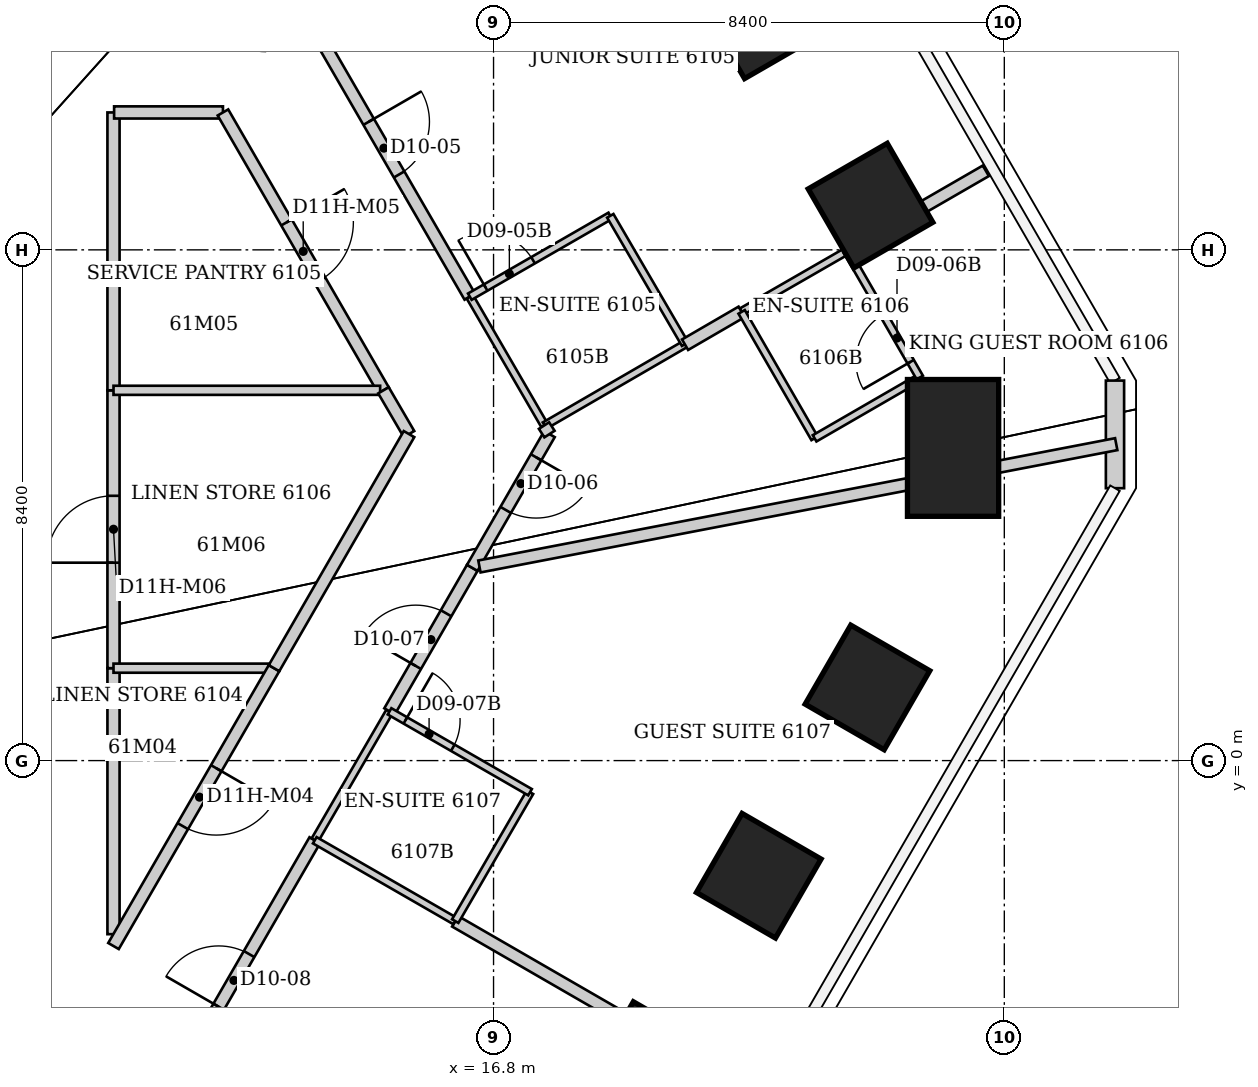
"""IFC4 building model, lengths in metres.
Left out: names, types, materials, properties, quantities, classifications, styles, units other than length and angle.
Written with IfcOpenShell. Run it as: python <this file> out.ifc"""

import sys

from ifc_helpers import new_model, si_unit, direction, frame, frame_2d, origin, origin_2d, place, context, subcontext, project, spatial, rectangle, extrude, element, fill, save


model = new_model("IFC4")
c1 = context("Model", 3, precision=1e-05, world=origin(), true_north=direction((0.0, 1.0)))
c2 = subcontext(c1, "Body", "Model", "MODEL_VIEW")
j1 = project(units=[si_unit("LENGTHUNIT", "METRE"), si_unit("PLANEANGLEUNIT", "RADIAN")], contexts=[c1])
p1 = place(None, origin())
s1 = spatial("IfcSite", under=j1, at=p1, CompositionType="ELEMENT")
p2 = place(p1, origin())
s2 = spatial("IfcBuilding", under=s1, at=p2, CompositionType="ELEMENT")
p3 = place(p2, frame((0.0, 0.0, 244.0)))
s3 = spatial("IfcBuildingStorey", under=s2, at=p3, CompositionType="ELEMENT", Elevation=244.0)
p4 = place(p3, frame((21.203, 12.241, 0.0), z_axis=(-0.05903355077, -0.034099727481, 0.997673417742), x_axis=(0.863904737752, 0.499019891948, 0.068174419916)))
e1 = element("IfcColumn", 1, at=p4, inside=s3, PredefinedType="COLUMN", context=c2, shape_type="SweptSolid", body=[
    extrude(rectangle(XDim=1.5, YDim=1.5, at=origin_2d()), origin(), (0.0, 0.0, 1.0), 3.809),
])
p5 = place(p3, frame((23.0, 9.127, 0.0), z_axis=(-0.064029932807, -0.025445328653, 0.997623527667), x_axis=(0.863429873399, 0.499842225125, 0.068166001086)))
e2 = element("IfcColumn", 2, at=p5, inside=s3, PredefinedType="COLUMN", context=c2, shape_type="SweptSolid", body=[
    extrude(rectangle(XDim=1.5, YDim=1.5, at=origin_2d()), origin(), (0.0, 0.0, 1.0), 3.809),
])
p6 = place(p3, frame((24.357, 5.143, 0.0), z_axis=(-0.069531443306, -0.014675300016, 0.997471811111), x_axis=(0.99757975799, -0.001092604117, 0.069522893098)))
e3 = element("IfcColumn", 3, at=p6, inside=s3, PredefinedType="COLUMN", context=c2, shape_type="SweptSolid", body=[
    extrude(rectangle(XDim=1.5, YDim=2.25, at=origin_2d()), origin(), (0.0, 0.0, 1.0), 3.81),
])
p7 = place(p3, frame((22.949, 1.203, 0.0), z_axis=(-0.064944143672, -0.003397867339, 0.997883115751), x_axis=(0.863717362202, -0.501020333053, 0.054506367508)))
e4 = element("IfcColumn", 4, at=p7, inside=s3, PredefinedType="COLUMN", context=c2, shape_type="SweptSolid", body=[
    extrude(rectangle(XDim=1.5, YDim=1.5, at=origin_2d()), origin(), (0.0, 0.0, 1.0), 3.808),
])
p8 = place(p3, frame((21.162, -1.894, 0.0), z_axis=(-0.059897811742, 0.005386955232, 0.998189978342), x_axis=(0.863828729651, -0.500824842558, 0.05453808675)))
e5 = element("IfcColumn", 5, at=p8, inside=s3, PredefinedType="COLUMN", context=c2, shape_type="SweptSolid", body=[
    extrude(rectangle(XDim=1.5, YDim=1.5, at=origin_2d()), origin(), (0.0, 0.0, 1.0), 3.807),
])
p9 = place(p3, frame((19.374, -4.991, 0.0), z_axis=(-0.054906736272, 0.014111544369, 0.998391764102), x_axis=(0.864606052926, -0.499473967902, 0.054608869531)))
e6 = element("IfcColumn", 6, at=p9, inside=s3, PredefinedType="COLUMN", context=c2, shape_type="SweptSolid", body=[
    extrude(rectangle(XDim=1.5, YDim=1.5, at=origin_2d()), origin(), (0.0, 0.0, 1.0), 3.806),
])
p10 = place(p3, frame((27.02, 6.25, 0.0), z_axis=(0.0, 0.0, 1.0), x_axis=(0.0, -1.0, 0.0)))
e7 = element("IfcWall", 7, at=p10, inside=s3, PredefinedType="SOLIDWALL", context=c2, shape_type="SweptSolid", body=[
    extrude(rectangle(XDim=1.77, YDim=0.3, at=frame_2d((0.885, 0.0))), origin(), (0.0, 0.0, 1.0), 3.64),
])
p11 = place(p3, frame((10.55, -2.855, 0.0), z_axis=(0.0, 0.0, 1.0), x_axis=(0.0, 1.0, 0.0)))
e8 = element("IfcWall", 8, at=p11, inside=s3, PredefinedType="PARTITIONING", context=c2, shape_type="SweptSolid", body=[
    extrude(rectangle(XDim=4.375, YDim=0.2, at=frame_2d((2.188, 0.0))), origin(), (0.0, 0.0, 1.0), 3.64),
])
p12 = place(p3, frame((10.55, 1.52, 0.0), z_axis=(0.0, 0.0, 1.0), x_axis=(0.0, 1.0, 0.0)))
e9 = element("IfcWall", 9, at=p12, inside=s3, PredefinedType="PARTITIONING", context=c2, shape_type="SweptSolid", body=[
    extrude(rectangle(XDim=4.57, YDim=0.2, at=frame_2d((2.285, 0.0))), origin(), (0.0, 0.0, 1.0), 3.64),
])
p13 = place(p12, frame((1.735, 0.0, 0.0)))
e10 = element("IfcOpeningElement", 10, at=p13, cuts=e9, PredefinedType="OPENING", context=c2, shape_type="SweptSolid", body=[
    extrude(rectangle(XDim=1.1, YDim=2.2, at=frame_2d((0.55, 1.1))), frame((0.0, 0.1, 0.0), z_axis=(0.0, -1.0, 0.0), x_axis=(1.0, 0.0, 0.0)), (0.0, 0.0, 1.0), 0.2),
])
p14 = place(p3, frame((10.55, 1.52, 0.0), z_axis=(0.0, 0.0, 1.0), x_axis=(1.0, 0.0, 0.0)))
e11 = element("IfcWall", 11, at=p14, inside=s3, PredefinedType="PARTITIONING", context=c2, shape_type="SweptSolid", body=[
    extrude(rectangle(XDim=2.585, YDim=0.15, at=frame_2d((1.292, 0.0))), origin(), (0.0, 0.0, 1.0), 3.64),
])
p15 = place(p3, frame((10.55, 6.09, 0.0), z_axis=(0.0, 0.0, 1.0), x_axis=(0.0, 1.0, 0.0)))
e12 = element("IfcWall", 12, at=p15, inside=s3, PredefinedType="PARTITIONING", context=c2, shape_type="SweptSolid", body=[
    extrude(rectangle(XDim=4.57, YDim=0.2, at=frame_2d((2.285, 0.0))), origin(), (0.0, 0.0, 1.0), 3.64),
])
p16 = place(p3, frame((10.56, 10.66, 0.0), z_axis=(0.0, 0.0, 1.0), x_axis=(1.0, 0.0, 0.0)))
e13 = element("IfcWall", 13, at=p16, inside=s3, PredefinedType="PARTITIONING", context=c2, shape_type="SweptSolid", body=[
    extrude(rectangle(XDim=1.79, YDim=0.2, at=frame_2d((0.895, 0.0))), origin(), (0.0, 0.0, 1.0), 3.64),
])
p17 = place(p3, frame((11.2, -5.92, 0.0), z_axis=(0.0, 0.0, 1.0), x_axis=(0.499809814479, 0.866135179606, 0.0)))
e14 = element("IfcWall", 14, at=p17, inside=s3, PredefinedType="PARTITIONING", context=c2, shape_type="SweptSolid", body=[
    extrude(rectangle(XDim=5.322, YDim=0.2, at=frame_2d((2.661, 0.0))), origin(), (0.0, 0.0, 1.0), 3.64),
])
p18 = place(p17, frame((2.161, 0.0, 0.0)))
e15 = element("IfcOpeningElement", 15, at=p18, cuts=e14, PredefinedType="OPENING", context=c2, shape_type="SweptSolid", body=[
    extrude(rectangle(XDim=1.0, YDim=2.13, at=frame_2d((0.5, 1.065))), frame((0.0, 0.1, 0.0), z_axis=(0.0, -1.0, 0.0), x_axis=(1.0, 0.0, 0.0)), (0.0, 0.0, 1.0), 0.2),
])
p19 = place(p3, frame((12.35, 10.66, 0.0), z_axis=(0.0, 0.0, 1.0), x_axis=(0.500213626659, -0.86590203124, 0.0)))
e16 = element("IfcWall", 16, at=p19, inside=s3, PredefinedType="PARTITIONING", context=c2, shape_type="SweptSolid", body=[
    extrude(rectangle(XDim=5.278, YDim=0.2, at=frame_2d((2.639, 0.0))), origin(), (0.0, 0.0, 1.0), 3.64),
])
p20 = place(p19, frame((2.089, 0.0, 0.0)))
e17 = element("IfcOpeningElement", 17, at=p20, cuts=e16, PredefinedType="OPENING", context=c2, shape_type="SweptSolid", body=[
    extrude(rectangle(XDim=1.1, YDim=2.2, at=frame_2d((0.55, 1.1))), frame((0.0, 0.1, 0.0), z_axis=(0.0, -1.0, 0.0), x_axis=(1.0, 0.0, 0.0)), (0.0, 0.0, 1.0), 0.2),
])
p21 = place(p3, frame((13.19, 1.52, 0.0), z_axis=(0.0, 0.0, 1.0), x_axis=(-0.500193590286, -0.865913605527, 0.0)))
e18 = element("IfcWall", 18, at=p21, inside=s3, PredefinedType="PARTITIONING", context=c2, shape_type="SweptSolid", body=[
    extrude(rectangle(XDim=5.278, YDim=0.2, at=frame_2d((2.639, 0.0))), origin(), (0.0, 0.0, 1.0), 3.64),
])
p22 = place(p21, frame((1.9, 0.0, 0.0)))
e19 = element("IfcOpeningElement", 19, at=p22, cuts=e18, PredefinedType="OPENING", context=c2, shape_type="SweptSolid", body=[
    extrude(rectangle(XDim=1.1, YDim=2.2, at=frame_2d((0.55, 1.1))), frame((0.0, 0.1, 0.0), z_axis=(0.0, -1.0, 0.0), x_axis=(1.0, 0.0, 0.0)), (0.0, 0.0, 1.0), 0.2),
])
p23 = place(p3, frame((13.583, 12.516, 0.0), z_axis=(0.0, 0.0, 1.0), x_axis=(0.500743006408, -0.865596003649, 0.0)))
e20 = element("IfcWall", 20, at=p23, inside=s3, PredefinedType="PARTITIONING", context=c2, shape_type="SweptSolid", body=[
    extrude(rectangle(XDim=5.645, YDim=0.2, at=frame_2d((2.823, 0.0))), origin(), (0.0, 0.0, 1.0), 3.64),
])
p24 = place(p23, frame((2.323, 0.0, 0.0)))
e21 = element("IfcOpeningElement", 21, at=p24, cuts=e20, PredefinedType="OPENING", context=c2, shape_type="SweptSolid", body=[
    extrude(rectangle(XDim=1.0, YDim=2.13, at=frame_2d((0.5, 1.065))), frame((0.0, 0.1, 0.0), z_axis=(0.0, -1.0, 0.0), x_axis=(1.0, 0.0, 0.0)), (0.0, 0.0, 1.0), 0.2),
])
p25 = place(p3, frame((13.86, -1.31, 0.0), z_axis=(0.0, 0.0, 1.0), x_axis=(0.501813488763, 0.864975850817, 0.0)))
e22 = element("IfcWall", 22, at=p25, inside=s3, PredefinedType="PARTITIONING", context=c2, shape_type="SweptSolid", body=[
    extrude(rectangle(XDim=2.451, YDim=0.12, at=frame_2d((1.226, 0.0))), origin(), (0.0, 0.0, 1.0), 3.64),
])
p26 = place(p3, frame((14.935, 6.09, 0.0), z_axis=(0.0, 0.0, 1.0), x_axis=(-1.0, 0.0, 0.0)))
e23 = element("IfcWall", 23, at=p26, inside=s3, PredefinedType="PARTITIONING", context=c2, shape_type="SweptSolid", body=[
    extrude(rectangle(XDim=4.385, YDim=0.15, at=frame_2d((2.192, 0.0))), origin(), (0.0, 0.0, 1.0), 3.64),
])
p27 = place(p3, frame((14.99, 6.09, 0.0), z_axis=(0.0, 0.0, 1.0), x_axis=(0.503816387241, -0.863810770914, 0.0)))
e24 = element("IfcWall", 24, at=p27, inside=s3, PredefinedType="PARTITIONING", context=c2, shape_type="SweptSolid", body=[
    extrude(rectangle(XDim=0.833, YDim=0.2, at=frame_2d((0.417, 0.0))), origin(), (0.0, 0.0, 1.0), 3.64),
])
p28 = place(p3, frame((15.09, 0.81, 0.0), z_axis=(0.0, 0.0, 1.0), x_axis=(0.499282656393, 0.866439166373, 0.0)))
e25 = element("IfcWall", 25, at=p28, inside=s3, PredefinedType="PARTITIONING", context=c2, shape_type="SweptSolid", body=[
    extrude(rectangle(XDim=2.724, YDim=0.2, at=frame_2d((1.362, 0.0))), origin(), (0.0, 0.0, 1.0), 3.64),
])
p29 = place(p28, frame((0.862, 0.0, 0.0)))
e26 = element("IfcOpeningElement", 26, at=p29, cuts=e25, PredefinedType="OPENING", context=c2, shape_type="SweptSolid", body=[
    extrude(rectangle(XDim=1.0, YDim=2.13, at=frame_2d((0.5, 1.065))), frame((0.0, 0.1, 0.0), z_axis=(0.0, -1.0, 0.0), x_axis=(1.0, 0.0, 0.0)), (0.0, 0.0, 1.0), 0.2),
])
p30 = place(p3, frame((15.41, 5.37, 0.0), z_axis=(0.0, 0.0, 1.0), x_axis=(-0.499513190454, -0.866306281036, 0.0)))
e27 = element("IfcWall", 27, at=p30, inside=s3, PredefinedType="PARTITIONING", context=c2, shape_type="SweptSolid", body=[
    extrude(rectangle(XDim=4.444, YDim=0.2, at=frame_2d((2.222, 0.0))), origin(), (0.0, 0.0, 1.0), 3.64),
])
p31 = place(p3, frame((16.168, -2.643, 0.0), z_axis=(0.0, 0.0, 1.0), x_axis=(0.865980633471, -0.500077536441, 0.0)))
e28 = element("IfcWall", 28, at=p31, inside=s3, PredefinedType="PARTITIONING", context=c2, shape_type="SweptSolid", body=[
    extrude(rectangle(XDim=5.713, YDim=0.2, at=frame_2d((2.857, 0.0))), origin(), (0.0, 0.0, 1.0), 3.64),
])
p32 = place(p3, frame((16.17, -2.64, 0.0), z_axis=(0.0, 0.0, 1.0), x_axis=(-0.86663205897, 0.498947767172, 0.0)))
e29 = element("IfcWall", 29, at=p32, inside=s3, PredefinedType="PARTITIONING", context=c2, shape_type="SweptSolid", body=[
    extrude(rectangle(XDim=2.665, YDim=0.12, at=frame_2d((1.333, 0.0))), origin(), (0.0, 0.0, 1.0), 3.64),
])
for number, where, z_axis, x_axis in (
    (30, (16.17, -2.64, 0.0), (0.0, 0.0, 1.0), (0.502, 0.865, 0.0)),
    (31, (16.41, 7.63, 0.0), (0.0, 0.0, 1.0), (0.502, -0.865, 0.0)),
):
    element("IfcWall", number, at=place(p3, frame(where, z_axis=z_axis, x_axis=x_axis)), inside=s3, PredefinedType="PARTITIONING", context=c2, shape_type="SweptSolid", body=[
        extrude(rectangle(XDim=2.451, YDim=0.12, at=frame_2d((1.226, 0.0))), origin(), (0.0, 0.0, 1.0), 3.64),
    ])
p33 = place(p3, frame((16.45, 3.17, 0.0), z_axis=(0.0, 0.0, 1.0), x_axis=(0.499922110319, 0.866070368743, 0.0)))
e32 = element("IfcWall", 32, at=p33, inside=s3, PredefinedType="PARTITIONING", context=c2, shape_type="SweptSolid", body=[
    extrude(rectangle(XDim=2.541, YDim=0.2, at=frame_2d((1.27, 0.0))), origin(), (0.0, 0.0, 1.0), 3.64),
])
p34 = place(p33, frame((1.1, 0.0, 0.0)))
e33 = element("IfcOpeningElement", 33, at=p34, cuts=e32, PredefinedType="OPENING", context=c2, shape_type="SweptSolid", body=[
    extrude(rectangle(XDim=1.0, YDim=2.13, at=frame_2d((0.5, 1.065))), frame((0.0, 0.1, 0.0), z_axis=(0.0, -1.0, 0.0), x_axis=(1.0, 0.0, 0.0)), (0.0, 0.0, 1.0), 0.2),
])
p35 = place(p3, frame((17.4, -0.52, 0.0), z_axis=(0.0, 0.0, 1.0), x_axis=(-0.866592449628, 0.499016559092, 0.0)))
e34 = element("IfcWall", 34, at=p35, inside=s3, PredefinedType="PARTITIONING", context=c2, shape_type="SweptSolid", body=[
    extrude(rectangle(XDim=2.665, YDim=0.12, at=frame_2d((1.333, 0.0))), origin(), (0.0, 0.0, 1.0), 3.64),
])
p36 = place(p35, frame((1.466, 0.0, 0.0)))
e35 = element("IfcOpeningElement", 35, at=p36, cuts=e34, PredefinedType="OPENING", context=c2, shape_type="SweptSolid", body=[
    extrude(rectangle(XDim=0.9, YDim=2.03, at=frame_2d((0.45, 1.015))), frame((0.0, 0.06, 0.0), z_axis=(0.0, -1.0, 0.0), x_axis=(1.0, 0.0, 0.0)), (0.0, 0.0, 1.0), 0.12),
])
p37 = place(p3, frame((17.64, 5.51, 0.0), z_axis=(0.0, 0.0, 1.0), x_axis=(0.86498992408, 0.501789229896, 0.0)))
e36 = element("IfcWall", 36, at=p37, inside=s3, PredefinedType="PARTITIONING", context=c2, shape_type="SweptSolid", body=[
    extrude(rectangle(XDim=2.671, YDim=0.12, at=frame_2d((1.335, 0.0))), origin(), (0.0, 0.0, 1.0), 3.64),
])
p38 = place(p3, frame((17.72, 5.37, 0.0), z_axis=(0.0, 0.0, 1.0), x_axis=(-0.540386452408, 0.841416948994, 0.0)))
e37 = element("IfcWall", 37, at=p38, inside=s3, PredefinedType="PARTITIONING", context=c2, shape_type="SweptSolid", body=[
    extrude(rectangle(XDim=0.166, YDim=0.2, at=frame_2d((0.083, 0.0))), origin(), (0.0, 0.0, 1.0), 3.64),
])
p39 = place(p3, frame((18.72, 8.96, 0.0), z_axis=(0.0, 0.0, 1.0), x_axis=(-0.866654860089, -0.498908161372, 0.0)))
e38 = element("IfcWall", 38, at=p39, inside=s3, PredefinedType="PARTITIONING", context=c2, shape_type="SweptSolid", body=[
    extrude(rectangle(XDim=2.666, YDim=0.12, at=frame_2d((1.333, 0.0))), origin(), (0.0, 0.0, 1.0), 3.64),
])
p40 = place(p39, frame((1.466, 0.0, 0.0)))
e39 = element("IfcOpeningElement", 39, at=p40, cuts=e38, PredefinedType="OPENING", context=c2, shape_type="SweptSolid", body=[
    extrude(rectangle(XDim=0.9, YDim=2.03, at=frame_2d((0.45, 1.015))), frame((0.0, 0.06, 0.0), z_axis=(0.0, -1.0, 0.0), x_axis=(1.0, 0.0, 0.0)), (0.0, 0.0, 1.0), 0.12),
])
p41 = place(p3, frame((19.95, 6.85, 0.0), z_axis=(0.0, 0.0, 1.0), x_axis=(-0.503634814725, 0.863916647251, 0.0)))
e40 = element("IfcWall", 40, at=p41, inside=s3, PredefinedType="PARTITIONING", context=c2, shape_type="SweptSolid", body=[
    extrude(rectangle(XDim=2.442, YDim=0.12, at=frame_2d((1.221, 0.0))), origin(), (0.0, 0.0, 1.0), 3.64),
])
p42 = place(p3, frame((20.878, 7.383, 0.0), z_axis=(0.0, 0.0, 1.0), x_axis=(0.866697688948, 0.498833755847, 0.0)))
e41 = element("IfcWall", 41, at=p42, inside=s3, PredefinedType="PARTITIONING", context=c2, shape_type="SweptSolid", body=[
    extrude(rectangle(XDim=1.998, YDim=0.12, at=frame_2d((0.999, 0.0))), origin(), (0.0, 0.0, 1.0), 3.64),
])
p43 = place(p3, frame((20.88, 7.38, 0.0), z_axis=(0.0, 0.0, 1.0), x_axis=(-0.864855730486, -0.502020483094, 0.0)))
e42 = element("IfcWall", 42, at=p43, inside=s3, PredefinedType="PARTITIONING", context=c2, shape_type="SweptSolid", body=[
    extrude(rectangle(XDim=1.075, YDim=0.2, at=frame_2d((0.538, 0.0))), origin(), (0.0, 0.0, 1.0), 3.64),
])
p44 = place(p3, frame((20.88, 7.38, 0.0), z_axis=(0.0, 0.0, 1.0), x_axis=(0.499813401482, -0.866133109688, 0.0)))
e43 = element("IfcWall", 43, at=p44, inside=s3, PredefinedType="PARTITIONING", context=c2, shape_type="SweptSolid", body=[
    extrude(rectangle(XDim=2.401, YDim=0.12, at=frame_2d((1.201, 0.0))), origin(), (0.0, 0.0, 1.0), 3.64),
])
p45 = place(p3, frame((22.08, 5.3, 0.0), z_axis=(0.0, 0.0, 1.0), x_axis=(0.865766263046, 0.50044857655, 0.0)))
e44 = element("IfcWall", 44, at=p45, inside=s3, PredefinedType="PARTITIONING", context=c2, shape_type="SweptSolid", body=[
    extrude(rectangle(XDim=1.998, YDim=0.12, at=frame_2d((0.999, 0.0))), origin(), (0.0, 0.0, 1.0), 3.64),
])
p46 = place(p3, frame((22.61, 8.38, 0.0), z_axis=(0.0, 0.0, 1.0), x_axis=(0.865974560031, 0.500088053625, 0.0)))
e45 = element("IfcWall", 45, at=p46, inside=s3, PredefinedType="PARTITIONING", context=c2, shape_type="SweptSolid", body=[
    extrude(rectangle(XDim=2.64, YDim=0.2, at=frame_2d((1.32, 0.0))), origin(), (0.0, 0.0, 1.0), 3.64),
])
p47 = place(p3, frame((23.81, 6.3, 0.0), z_axis=(0.0, 0.0, 1.0), x_axis=(-0.499737123639, 0.866177122335, 0.0)))
e46 = element("IfcWall", 46, at=p47, inside=s3, PredefinedType="PARTITIONING", context=c2, shape_type="SweptSolid", body=[
    extrude(rectangle(XDim=2.401, YDim=0.12, at=frame_2d((1.201, 0.0))), origin(), (0.0, 0.0, 1.0), 2.14),
])
p48 = place(p47, frame((0.3, 0.0, 0.0)))
e47 = element("IfcOpeningElement", 47, at=p48, cuts=e46, PredefinedType="OPENING", context=c2, shape_type="SweptSolid", body=[
    extrude(rectangle(XDim=0.9, YDim=2.03, at=frame_2d((0.45, 1.015))), frame((0.0, 0.06, 0.0), z_axis=(0.0, -1.0, 0.0), x_axis=(1.0, 0.0, 0.0)), (0.0, 0.0, 1.0), 0.12),
])
p49 = place(p3, frame((27.041, 5.204, 0.0), z_axis=(0.0, 0.0, 1.0), x_axis=(-0.98204561609, -0.188643600256, 0.0)))
e48 = element("IfcWall", 48, at=p49, inside=s3, PredefinedType="PARTITIONING", context=c2, shape_type="SweptSolid", body=[
    extrude(rectangle(XDim=10.664, YDim=0.2, at=frame_2d((5.332, 0.0))), origin(), (0.0, 0.0, 1.0), 3.64),
])
p50 = place(p24, origin())
e49 = element("IfcDoor", 49, at=p50, inside=s3, OperationType="SINGLE_SWING_LEFT", PredefinedType="DOOR", context=c2, shape_type="SweptSolid", body=[
    extrude(rectangle(XDim=1.0, YDim=2.13, at=frame_2d((0.5, 1.065))), frame((0.0, 0.025, 0.0), z_axis=(0.0, -1.0, 0.0), x_axis=(1.0, 0.0, 0.0)), (0.0, 0.0, 1.0), 0.05),
])
fill(e21, e49)
p51 = place(p40, origin())
e50 = element("IfcDoor", 50, at=p51, inside=s3, OperationType="SINGLE_SWING_RIGHT", PredefinedType="DOOR", context=c2, shape_type="SweptSolid", body=[
    extrude(rectangle(XDim=0.9, YDim=2.03, at=frame_2d((0.45, 1.015))), frame((0.0, 0.025, 0.0), z_axis=(0.0, -1.0, 0.0), x_axis=(1.0, 0.0, 0.0)), (0.0, 0.0, 1.0), 0.05),
])
fill(e39, e50)
p52 = place(p34, origin())
e51 = element("IfcDoor", 51, at=p52, inside=s3, OperationType="SINGLE_SWING_RIGHT", PredefinedType="DOOR", context=c2, shape_type="SweptSolid", body=[
    extrude(rectangle(XDim=1.0, YDim=2.13, at=frame_2d((0.5, 1.065))), frame((0.0, 0.025, 0.0), z_axis=(0.0, -1.0, 0.0), x_axis=(1.0, 0.0, 0.0)), (0.0, 0.0, 1.0), 0.05),
])
fill(e33, e51)
p53 = place(p48, origin())
e52 = element("IfcDoor", 52, at=p53, inside=s3, OperationType="SINGLE_SWING_LEFT", PredefinedType="DOOR", context=c2, shape_type="SweptSolid", body=[
    extrude(rectangle(XDim=0.9, YDim=2.03, at=frame_2d((0.45, 1.015))), frame((0.0, 0.025, 0.0), z_axis=(0.0, -1.0, 0.0), x_axis=(1.0, 0.0, 0.0)), (0.0, 0.0, 1.0), 0.05),
])
fill(e47, e52)
p54 = place(p29, origin())
e53 = element("IfcDoor", 53, at=p54, inside=s3, OperationType="SINGLE_SWING_LEFT", PredefinedType="DOOR", context=c2, shape_type="SweptSolid", body=[
    extrude(rectangle(XDim=1.0, YDim=2.13, at=frame_2d((0.5, 1.065))), frame((0.0, 0.025, 0.0), z_axis=(0.0, -1.0, 0.0), x_axis=(1.0, 0.0, 0.0)), (0.0, 0.0, 1.0), 0.05),
])
fill(e26, e53)
p55 = place(p36, origin())
e54 = element("IfcDoor", 54, at=p55, inside=s3, OperationType="SINGLE_SWING_RIGHT", PredefinedType="DOOR", context=c2, shape_type="SweptSolid", body=[
    extrude(rectangle(XDim=0.9, YDim=2.03, at=frame_2d((0.45, 1.015))), frame((0.0, 0.025, 0.0), z_axis=(0.0, -1.0, 0.0), x_axis=(1.0, 0.0, 0.0)), (0.0, 0.0, 1.0), 0.05),
])
fill(e35, e54)
p56 = place(p18, origin())
e55 = element("IfcDoor", 55, at=p56, inside=s3, OperationType="SINGLE_SWING_LEFT", PredefinedType="DOOR", context=c2, shape_type="SweptSolid", body=[
    extrude(rectangle(XDim=1.0, YDim=2.13, at=frame_2d((0.5, 1.065))), frame((0.0, 0.025, 0.0), z_axis=(0.0, -1.0, 0.0), x_axis=(1.0, 0.0, 0.0)), (0.0, 0.0, 1.0), 0.05),
])
fill(e15, e55)
p57 = place(p22, origin())
e56 = element("IfcDoor", 56, at=p57, inside=s3, OperationType="SINGLE_SWING_LEFT", PredefinedType="DOOR", context=c2, shape_type="SweptSolid", body=[
    extrude(rectangle(XDim=1.1, YDim=2.2, at=frame_2d((0.55, 1.1))), frame((0.0, 0.025, 0.0), z_axis=(0.0, -1.0, 0.0), x_axis=(1.0, 0.0, 0.0)), (0.0, 0.0, 1.0), 0.05),
])
fill(e19, e56)
p58 = place(p20, origin())
e57 = element("IfcDoor", 57, at=p58, inside=s3, OperationType="SINGLE_SWING_LEFT", PredefinedType="DOOR", context=c2, shape_type="SweptSolid", body=[
    extrude(rectangle(XDim=1.1, YDim=2.2, at=frame_2d((0.55, 1.1))), frame((0.0, 0.025, 0.0), z_axis=(0.0, -1.0, 0.0), x_axis=(1.0, 0.0, 0.0)), (0.0, 0.0, 1.0), 0.05),
])
fill(e17, e57)
p59 = place(p13, origin())
e58 = element("IfcDoor", 58, at=p59, inside=s3, OperationType="SINGLE_SWING_LEFT", PredefinedType="DOOR", context=c2, shape_type="SweptSolid", body=[
    extrude(rectangle(XDim=1.1, YDim=2.2, at=frame_2d((0.55, 1.1))), frame((0.0, 0.025, 0.0), z_axis=(0.0, -1.0, 0.0), x_axis=(1.0, 0.0, 0.0)), (0.0, 0.0, 1.0), 0.05),
])
fill(e10, e58)
save(model, sys.argv[1])
